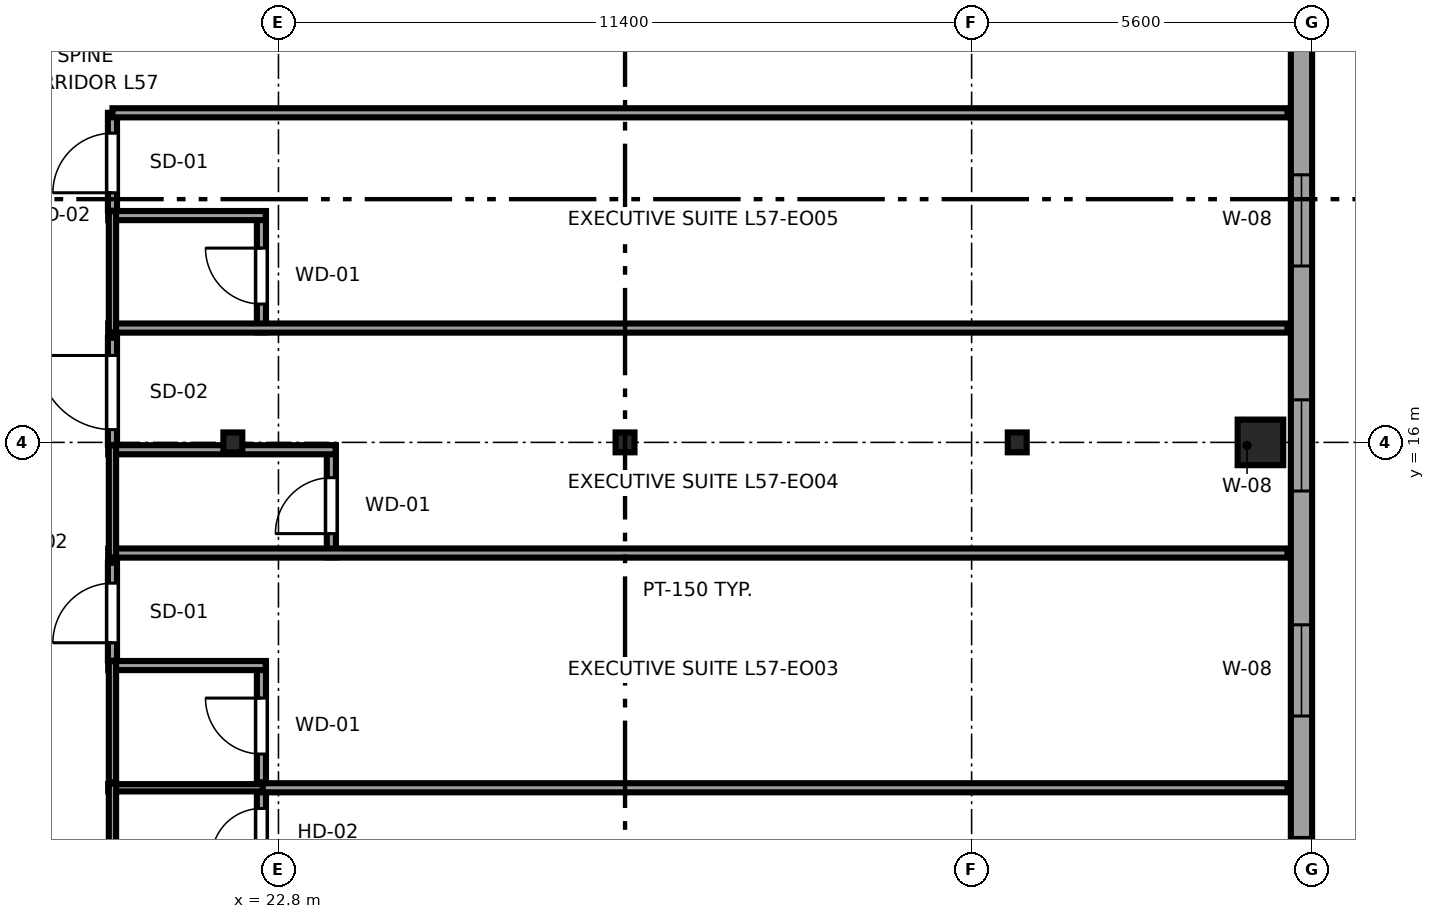
"""IFC4 building model, lengths in metres.
Left out: names, types, materials, properties, quantities, classifications, styles, units other than length and angle.
Written with IfcOpenShell. Run it as: python <this file> out.ifc"""

import sys

from ifc_helpers import new_model, si_unit, direction, frame, frame_2d, origin, origin_2d, place, context, subcontext, project, spatial, rectangle, i_section, extrude, source, transform, mapped, element, fill, save


model = new_model("IFC4")
c1 = context("Model", 3, precision=1e-05, world=origin(), true_north=direction((0.0, 1.0)))
c2 = subcontext(c1, "Body", "Model", "MODEL_VIEW")
j1 = project(units=[si_unit("LENGTHUNIT", "METRE"), si_unit("PLANEANGLEUNIT", "RADIAN")], contexts=[c1])
p1 = place(None, origin())
s1 = spatial("IfcSite", under=j1, at=p1, CompositionType="ELEMENT")
p2 = place(p1, origin())
s2 = spatial("IfcBuilding", under=s1, at=p2, CompositionType="ELEMENT")
p3 = place(p2, frame((0.0, 0.0, 216.8)))
s3 = spatial("IfcBuildingStorey", under=s2, at=p3, CompositionType="ELEMENT", Elevation=216.8)
m1 = source(origin(), c2, "Body", "SweptSolid", [
    extrude(i_section(OverallWidth=0.311, OverallDepth=0.327, WebThickness=0.016, FlangeThickness=0.025, FilletRadius=0.017, at=origin_2d()), origin(), (0.0, 0.0, 1.0), 3.55),
])
for number, where, z_axis, x_axis in (
    (1, (22.05, 16.0, 0.0), (0.0, 0.0, 1.0), (1.0, 0.0, 0.0)),
    (2, (28.5, 16.0, 0.0), (0.0, 0.0, 1.0), (1.0, 0.0, 0.0)),
    (3, (34.95, 16.0, 0.0), (0.0, 0.0, 1.0), (1.0, 0.0, 0.0)),
):
    element("IfcColumn", number, at=place(p3, frame(where, z_axis=z_axis, x_axis=x_axis)), inside=s3, PredefinedType="COLUMN", context=c2, shape_type="MappedRepresentation", body=[
        mapped(m1, transform((0.0, 0.0, 0.0), x_axis=(1.0, 0.0, 0.0), y_axis=(0.0, 1.0, 0.0), z_axis=(0.0, 0.0, 1.0), scale=1.0)),
    ])
m2 = source(origin(), c2, "Body", "SweptSolid", [
    extrude(rectangle(XDim=0.75, YDim=0.75, at=origin_2d()), origin(), (0.0, 0.0, 1.0), 3.55),
])
p4 = place(p3, frame((38.95, 16.0, 0.0), z_axis=(0.0, 0.0, 1.0), x_axis=(1.0, 0.0, 0.0)))
e4 = element("IfcColumn", 4, at=p4, inside=s3, PredefinedType="COLUMN", context=c2, shape_type="MappedRepresentation", body=[
    mapped(m2, transform((0.0, 0.0, 0.0), x_axis=(1.0, 0.0, 0.0), y_axis=(0.0, 1.0, 0.0), z_axis=(0.0, 0.0, 1.0), scale=1.0)),
])
p5 = place(p3, frame((39.625, 7.017, 0.0), z_axis=(0.0, 0.0, 1.0), x_axis=(0.0, 1.0, 0.0)))
e5 = element("IfcWall", 5, at=p5, inside=s3, PredefinedType="SOLIDWALL", context=c2, shape_type="SweptSolid", body=[
    extrude(rectangle(XDim=24.579, YDim=0.35, at=frame_2d((12.29, 0.0))), origin(), (0.0, 0.0, 1.0), 3.37),
])
p6 = place(p5, frame((20.291, 0.0, 0.68)))
e6 = element("IfcOpeningElement", 6, at=p6, cuts=e5, PredefinedType="OPENING", context=c2, shape_type="SweptSolid", body=[
    extrude(rectangle(XDim=2.7, YDim=1.95, at=frame_2d((1.35, 0.975))), frame((0.0, 0.185, 0.0), z_axis=(0.0, -1.0, 0.0), x_axis=(1.0, 0.0, 0.0)), (0.0, 0.0, 1.0), 0.37),
])
p7 = place(p5, frame((0.986, 0.0, 0.62)))
e7 = element("IfcOpeningElement", 7, at=p7, cuts=e5, PredefinedType="OPENING", context=c2, shape_type="SweptSolid", body=[
    extrude(rectangle(XDim=1.5, YDim=1.55, at=frame_2d((0.75, 0.775))), frame((0.0, 0.185, 0.0), z_axis=(0.0, -1.0, 0.0), x_axis=(1.0, 0.0, 0.0)), (0.0, 0.0, 1.0), 0.37),
])
p8 = place(p5, frame((4.483, 0.0, 0.62)))
e8 = element("IfcOpeningElement", 8, at=p8, cuts=e5, PredefinedType="OPENING", context=c2, shape_type="SweptSolid", body=[
    extrude(rectangle(XDim=1.5, YDim=1.55, at=frame_2d((0.75, 0.775))), frame((0.0, 0.185, 0.0), z_axis=(0.0, -1.0, 0.0), x_axis=(1.0, 0.0, 0.0)), (0.0, 0.0, 1.0), 0.37),
])
p9 = place(p5, frame((8.183, 0.0, 0.62)))
e9 = element("IfcOpeningElement", 9, at=p9, cuts=e5, PredefinedType="OPENING", context=c2, shape_type="SweptSolid", body=[
    extrude(rectangle(XDim=1.5, YDim=1.55, at=frame_2d((0.75, 0.775))), frame((0.0, 0.185, 0.0), z_axis=(0.0, -1.0, 0.0), x_axis=(1.0, 0.0, 0.0)), (0.0, 0.0, 1.0), 0.37),
])
p10 = place(p5, frame((11.883, 0.0, 0.62)))
e10 = element("IfcOpeningElement", 10, at=p10, cuts=e5, PredefinedType="OPENING", context=c2, shape_type="SweptSolid", body=[
    extrude(rectangle(XDim=1.5, YDim=1.55, at=frame_2d((0.75, 0.775))), frame((0.0, 0.185, 0.0), z_axis=(0.0, -1.0, 0.0), x_axis=(1.0, 0.0, 0.0)), (0.0, 0.0, 1.0), 0.37),
])
p11 = place(p3, frame((22.52, 8.4, 0.0), z_axis=(0.0, 0.0, 1.0), x_axis=(0.0, 1.0, 0.0)))
e11 = element("IfcWall", 11, at=p11, inside=s3, PredefinedType="PARTITIONING", context=c2, shape_type="SweptSolid", body=[
    extrude(rectangle(XDim=1.99, YDim=0.15, at=frame_2d((0.995, 0.0))), origin(), (0.0, 0.0, 1.0), 3.37),
])
p12 = place(p11, frame((0.76, 0.0, 0.0)))
e12 = element("IfcOpeningElement", 12, at=p12, cuts=e11, PredefinedType="OPENING", context=c2, shape_type="SweptSolid", body=[
    extrude(rectangle(XDim=0.82, YDim=2.01, at=frame_2d((0.41, 1.005))), frame((0.0, 0.085, 0.0), z_axis=(0.0, -1.0, 0.0), x_axis=(1.0, 0.0, 0.0)), (0.0, 0.0, 1.0), 0.17),
])
p13 = place(p3, frame((20.0, 10.32, 0.0), z_axis=(0.0, 0.0, 1.0), x_axis=(1.0, 0.0, 0.0)))
e13 = element("IfcWall", 13, at=p13, inside=s3, PredefinedType="PLUMBINGWALL", context=c2, shape_type="SweptSolid", body=[
    extrude(rectangle(XDim=2.59, YDim=0.12, at=frame_2d((1.295, 0.0))), origin(), (0.0, 0.0, 1.0), 3.37),
])
p14 = place(p3, frame((20.07, 8.4, 0.0), z_axis=(0.0, 0.0, 1.0), x_axis=(0.0, 1.0, 0.0)))
e14 = element("IfcWall", 14, at=p14, inside=s3, PredefinedType="PLUMBINGWALL", context=c2, shape_type="SweptSolid", body=[
    extrude(rectangle(XDim=1.99, YDim=0.12, at=frame_2d((0.995, 0.0))), origin(), (0.0, 0.0, 1.0), 3.37),
])
p15 = place(p3, frame((22.52, 10.41, 0.0), z_axis=(0.0, 0.0, 1.0), x_axis=(0.0, 1.0, 0.0)))
e15 = element("IfcWall", 15, at=p15, inside=s3, PredefinedType="PARTITIONING", context=c2, shape_type="SweptSolid", body=[
    extrude(rectangle(XDim=1.99, YDim=0.15, at=frame_2d((0.995, 0.0))), origin(), (0.0, 0.0, 1.0), 3.37),
])
p16 = place(p15, frame((0.465, 0.0, 0.0)))
e16 = element("IfcOpeningElement", 16, at=p16, cuts=e15, PredefinedType="OPENING", context=c2, shape_type="SweptSolid", body=[
    extrude(rectangle(XDim=0.92, YDim=2.01, at=frame_2d((0.46, 1.005))), frame((0.0, 0.085, 0.0), z_axis=(0.0, -1.0, 0.0), x_axis=(1.0, 0.0, 0.0)), (0.0, 0.0, 1.0), 0.17),
])
p17 = place(p3, frame((20.0, 12.33, 0.0), z_axis=(0.0, 0.0, 1.0), x_axis=(1.0, 0.0, 0.0)))
e17 = element("IfcWall", 17, at=p17, inside=s3, PredefinedType="PARTITIONING", context=c2, shape_type="SweptSolid", body=[
    extrude(rectangle(XDim=2.59, YDim=0.15, at=frame_2d((1.295, 0.0))), origin(), (0.0, 0.0, 1.0), 3.37),
])
p18 = place(p3, frame((20.07, 10.41, 0.0), z_axis=(0.0, 0.0, 1.0), x_axis=(0.0, 1.0, 0.0)))
e18 = element("IfcWall", 18, at=p18, inside=s3, PredefinedType="PLUMBINGWALL", context=c2, shape_type="SweptSolid", body=[
    extrude(rectangle(XDim=1.99, YDim=0.12, at=frame_2d((0.995, 0.0))), origin(), (0.0, 0.0, 1.0), 3.37),
])
p19 = place(p3, frame((23.67, 14.11, 0.0), z_axis=(0.0, 0.0, 1.0), x_axis=(0.0, 1.0, 0.0)))
e19 = element("IfcWall", 19, at=p19, inside=s3, PredefinedType="PARTITIONING", context=c2, shape_type="SweptSolid", body=[
    extrude(rectangle(XDim=1.839, YDim=0.15, at=frame_2d((0.919, 0.0))), origin(), (0.0, 0.0, 1.0), 3.37),
])
p20 = place(p19, frame((0.389, 0.0, 0.0)))
e20 = element("IfcOpeningElement", 20, at=p20, cuts=e19, PredefinedType="OPENING", context=c2, shape_type="SweptSolid", body=[
    extrude(rectangle(XDim=0.92, YDim=2.01, at=frame_2d((0.46, 1.005))), frame((0.0, 0.085, 0.0), z_axis=(0.0, -1.0, 0.0), x_axis=(1.0, 0.0, 0.0)), (0.0, 0.0, 1.0), 0.17),
])
p21 = place(p3, frame((20.0, 14.18, 0.0), z_axis=(0.0, 0.0, 1.0), x_axis=(1.0, 0.0, 0.0)))
e21 = element("IfcWall", 21, at=p21, inside=s3, PredefinedType="PARTITIONING", context=c2, shape_type="SweptSolid", body=[
    extrude(rectangle(XDim=19.395, YDim=0.15, at=frame_2d((9.698, 0.0))), origin(), (0.0, 0.0, 1.0), 3.37),
])
p22 = place(p3, frame((20.0, 15.879, 0.0), z_axis=(0.0, 0.0, 1.0), x_axis=(1.0, 0.0, 0.0)))
e22 = element("IfcWall", 22, at=p22, inside=s3, PredefinedType="PARTITIONING", context=c2, shape_type="SweptSolid", body=[
    extrude(rectangle(XDim=3.74, YDim=0.15, at=frame_2d((1.87, 0.0))), origin(), (0.0, 0.0, 1.0), 2.758),
])
p23 = place(p3, frame((20.07, 14.11, 0.0), z_axis=(0.0, 0.0, 1.0), x_axis=(0.0, 1.0, 0.0)))
e23 = element("IfcWall", 23, at=p23, inside=s3, PredefinedType="PLUMBINGWALL", context=c2, shape_type="SweptSolid", body=[
    extrude(rectangle(XDim=1.839, YDim=0.12, at=frame_2d((0.919, 0.0))), origin(), (0.0, 0.0, 1.0), 3.37),
])
p24 = place(p3, frame((22.52, 17.81, 0.0), z_axis=(0.0, 0.0, 1.0), x_axis=(0.0, 1.0, 0.0)))
e24 = element("IfcWall", 24, at=p24, inside=s3, PredefinedType="PARTITIONING", context=c2, shape_type="SweptSolid", body=[
    extrude(rectangle(XDim=1.99, YDim=0.15, at=frame_2d((0.995, 0.0))), origin(), (0.0, 0.0, 1.0), 3.37),
])
p25 = place(p24, frame((0.465, 0.0, 0.0)))
e25 = element("IfcOpeningElement", 25, at=p25, cuts=e24, PredefinedType="OPENING", context=c2, shape_type="SweptSolid", body=[
    extrude(rectangle(XDim=0.92, YDim=2.01, at=frame_2d((0.46, 1.005))), frame((0.0, 0.085, 0.0), z_axis=(0.0, -1.0, 0.0), x_axis=(1.0, 0.0, 0.0)), (0.0, 0.0, 1.0), 0.17),
])
p26 = place(p3, frame((20.0, 17.88, 0.0), z_axis=(0.0, 0.0, 1.0), x_axis=(1.0, 0.0, 0.0)))
e26 = element("IfcWall", 26, at=p26, inside=s3, PredefinedType="PARTITIONING", context=c2, shape_type="SweptSolid", body=[
    extrude(rectangle(XDim=19.395, YDim=0.15, at=frame_2d((9.698, 0.0))), origin(), (0.0, 0.0, 1.0), 3.37),
])
p27 = place(p3, frame((20.0, 19.73, 0.0), z_axis=(0.0, 0.0, 1.0), x_axis=(1.0, 0.0, 0.0)))
e27 = element("IfcWall", 27, at=p27, inside=s3, PredefinedType="PARTITIONING", context=c2, shape_type="SweptSolid", body=[
    extrude(rectangle(XDim=2.59, YDim=0.15, at=frame_2d((1.295, 0.0))), origin(), (0.0, 0.0, 1.0), 3.37),
])
p28 = place(p3, frame((20.07, 17.81, 0.0), z_axis=(0.0, 0.0, 1.0), x_axis=(0.0, 1.0, 0.0)))
e28 = element("IfcWall", 28, at=p28, inside=s3, PredefinedType="PLUMBINGWALL", context=c2, shape_type="SweptSolid", body=[
    extrude(rectangle(XDim=1.99, YDim=0.12, at=frame_2d((0.995, 0.0))), origin(), (0.0, 0.0, 1.0), 3.37),
])
p29 = place(p3, frame((22.54, 10.32, 0.0), z_axis=(0.0, 0.0, 1.0), x_axis=(1.0, 0.0, 0.0)))
e29 = element("IfcWall", 29, at=p29, inside=s3, PredefinedType="PARTITIONING", context=c2, shape_type="SweptSolid", body=[
    extrude(rectangle(XDim=16.855, YDim=0.15, at=frame_2d((8.427, 0.0))), origin(), (0.0, 0.0, 1.0), 3.37),
])
p30 = place(p3, frame((20.07, 12.41, 0.0), z_axis=(0.0, 0.0, 1.0), x_axis=(0.0, 1.0, 0.0)))
e30 = element("IfcWall", 30, at=p30, inside=s3, PredefinedType="PARTITIONING", context=c2, shape_type="SweptSolid", body=[
    extrude(rectangle(XDim=1.61, YDim=0.15, at=frame_2d((0.805, 0.0))), origin(), (0.0, 0.0, 1.0), 3.37),
])
p31 = place(p30, frame((0.295, 0.0, 0.0)))
e31 = element("IfcOpeningElement", 31, at=p31, cuts=e30, PredefinedType="OPENING", context=c2, shape_type="SweptSolid", body=[
    extrude(rectangle(XDim=0.98, YDim=2.12, at=frame_2d((0.49, 1.06))), frame((0.0, 0.085, 0.0), z_axis=(0.0, -1.0, 0.0), x_axis=(1.0, 0.0, 0.0)), (0.0, 0.0, 1.0), 0.17),
])
p32 = place(p3, frame((20.07, 15.959, 0.0), z_axis=(0.0, 0.0, 1.0), x_axis=(0.0, 1.0, 0.0)))
e32 = element("IfcWall", 32, at=p32, inside=s3, PredefinedType="PARTITIONING", context=c2, shape_type="SweptSolid", body=[
    extrude(rectangle(XDim=1.761, YDim=0.15, at=frame_2d((0.88, 0.0))), origin(), (0.0, 0.0, 1.0), 3.37),
])
p33 = place(p32, frame((0.25, 0.0, 0.0)))
e33 = element("IfcOpeningElement", 33, at=p33, cuts=e32, PredefinedType="OPENING", context=c2, shape_type="SweptSolid", body=[
    extrude(rectangle(XDim=1.22, YDim=2.08, at=frame_2d((0.61, 1.04))), frame((0.0, 0.085, 0.0), z_axis=(0.0, -1.0, 0.0), x_axis=(1.0, 0.0, 0.0)), (0.0, 0.0, 1.0), 0.17),
])
p34 = place(p3, frame((20.07, 19.81, 0.0), z_axis=(0.0, 0.0, 1.0), x_axis=(0.0, 1.0, 0.0)))
e34 = element("IfcWall", 34, at=p34, inside=s3, PredefinedType="PARTITIONING", context=c2, shape_type="SweptSolid", body=[
    extrude(rectangle(XDim=1.61, YDim=0.15, at=frame_2d((0.805, 0.0))), origin(), (0.0, 0.0, 1.0), 3.37),
])
p35 = place(p34, frame((0.295, 0.0, 0.0)))
e35 = element("IfcOpeningElement", 35, at=p35, cuts=e34, PredefinedType="OPENING", context=c2, shape_type="SweptSolid", body=[
    extrude(rectangle(XDim=0.98, YDim=2.12, at=frame_2d((0.49, 1.06))), frame((0.0, 0.085, 0.0), z_axis=(0.0, -1.0, 0.0), x_axis=(1.0, 0.0, 0.0)), (0.0, 0.0, 1.0), 0.17),
])
p36 = place(p3, frame((20.07, 21.42, 0.0), z_axis=(0.0, 0.0, 1.0), x_axis=(1.0, 0.0, 0.0)))
e36 = element("IfcWall", 36, at=p36, inside=s3, PredefinedType="PARTITIONING", context=c2, shape_type="SweptSolid", body=[
    extrude(rectangle(XDim=19.325, YDim=0.15, at=frame_2d((9.663, 0.0))), origin(), (0.0, 0.0, 1.0), 3.37),
])
m3 = source(origin(), c2, "Body", "SweptSolid", [
    extrude(rectangle(XDim=1.5, YDim=1.55, at=frame_2d((0.75, 0.775))), frame((0.0, 0.09, 0.0), z_axis=(0.0, -1.0, 0.0), x_axis=(1.0, 0.0, 0.0)), (0.0, 0.0, 1.0), 0.06),
])
p37 = place(p7, origin())
e37 = element("IfcWindow", 37, at=p37, inside=s3, PartitioningType="SINGLE_PANEL", PredefinedType="WINDOW", context=c2, shape_type="MappedRepresentation", body=[
    mapped(m3, transform((0.0, 0.0, 0.0), x_axis=(1.0, 0.0, 0.0), y_axis=(0.0, 1.0, 0.0), z_axis=(0.0, 0.0, 1.0), scale=1.0)),
])
fill(e7, e37)
p38 = place(p8, origin())
e38 = element("IfcWindow", 38, at=p38, inside=s3, PartitioningType="SINGLE_PANEL", PredefinedType="WINDOW", context=c2, shape_type="MappedRepresentation", body=[
    mapped(m3, transform((0.0, 0.0, 0.0), x_axis=(1.0, 0.0, 0.0), y_axis=(0.0, 1.0, 0.0), z_axis=(0.0, 0.0, 1.0), scale=1.0)),
])
fill(e8, e38)
p39 = place(p9, origin())
e39 = element("IfcWindow", 39, at=p39, inside=s3, PartitioningType="SINGLE_PANEL", PredefinedType="WINDOW", context=c2, shape_type="MappedRepresentation", body=[
    mapped(m3, transform((0.0, 0.0, 0.0), x_axis=(1.0, 0.0, 0.0), y_axis=(0.0, 1.0, 0.0), z_axis=(0.0, 0.0, 1.0), scale=1.0)),
])
fill(e9, e39)
p40 = place(p10, origin())
e40 = element("IfcWindow", 40, at=p40, inside=s3, PartitioningType="SINGLE_PANEL", PredefinedType="WINDOW", context=c2, shape_type="MappedRepresentation", body=[
    mapped(m3, transform((0.0, 0.0, 0.0), x_axis=(1.0, 0.0, 0.0), y_axis=(0.0, 1.0, 0.0), z_axis=(0.0, 0.0, 1.0), scale=1.0)),
])
fill(e10, e40)
m4 = source(origin(), c2, "Body", "SweptSolid", [
    extrude(rectangle(XDim=0.82, YDim=2.01, at=frame_2d((0.41, 1.005))), frame((0.0, 0.025, 0.0), z_axis=(0.0, -1.0, 0.0), x_axis=(1.0, 0.0, 0.0)), (0.0, 0.0, 1.0), 0.05),
])
p41 = place(p12, origin())
e41 = element("IfcDoor", 41, at=p41, inside=s3, OperationType="SINGLE_SWING_LEFT", PredefinedType="DOOR", context=c2, shape_type="MappedRepresentation", body=[
    mapped(m4, transform((0.0, 0.0, 0.0), x_axis=(1.0, 0.0, 0.0), y_axis=(0.0, 1.0, 0.0), z_axis=(0.0, 0.0, 1.0), scale=1.0)),
])
fill(e12, e41)
m5 = source(origin(), c2, "Body", "SweptSolid", [
    extrude(rectangle(XDim=0.92, YDim=2.01, at=frame_2d((0.46, 1.005))), frame((0.0, 0.025, 0.0), z_axis=(0.0, -1.0, 0.0), x_axis=(1.0, 0.0, 0.0)), (0.0, 0.0, 1.0), 0.05),
])
p42 = place(p16, origin())
e42 = element("IfcDoor", 42, at=p42, inside=s3, OperationType="SINGLE_SWING_RIGHT", PredefinedType="DOOR", context=c2, shape_type="MappedRepresentation", body=[
    mapped(m5, transform((0.0, 0.0, 0.0), x_axis=(1.0, 0.0, 0.0), y_axis=(0.0, 1.0, 0.0), z_axis=(0.0, 0.0, 1.0), scale=1.0)),
])
fill(e16, e42)
p43 = place(p20, origin())
e43 = element("IfcDoor", 43, at=p43, inside=s3, OperationType="SINGLE_SWING_LEFT", PredefinedType="DOOR", context=c2, shape_type="MappedRepresentation", body=[
    mapped(m5, transform((0.0, 0.0, 0.0), x_axis=(1.0, 0.0, 0.0), y_axis=(0.0, 1.0, 0.0), z_axis=(0.0, 0.0, 1.0), scale=1.0)),
])
fill(e20, e43)
p44 = place(p25, origin())
e44 = element("IfcDoor", 44, at=p44, inside=s3, OperationType="SINGLE_SWING_RIGHT", PredefinedType="DOOR", context=c2, shape_type="MappedRepresentation", body=[
    mapped(m5, transform((0.0, 0.0, 0.0), x_axis=(1.0, 0.0, 0.0), y_axis=(0.0, 1.0, 0.0), z_axis=(0.0, 0.0, 1.0), scale=1.0)),
])
fill(e25, e44)
m6 = source(origin(), c2, "Body", "SweptSolid", [
    extrude(rectangle(XDim=0.98, YDim=2.12, at=frame_2d((0.49, 1.06))), frame((0.0, 0.025, 0.0), z_axis=(0.0, -1.0, 0.0), x_axis=(1.0, 0.0, 0.0)), (0.0, 0.0, 1.0), 0.05),
])
p45 = place(p31, origin())
e45 = element("IfcDoor", 45, at=p45, inside=s3, OperationType="SINGLE_SWING_LEFT", PredefinedType="DOOR", context=c2, shape_type="MappedRepresentation", body=[
    mapped(m6, transform((0.0, 0.0, 0.0), x_axis=(1.0, 0.0, 0.0), y_axis=(0.0, 1.0, 0.0), z_axis=(0.0, 0.0, 1.0), scale=1.0)),
])
fill(e31, e45)
m7 = source(origin(), c2, "Body", "SweptSolid", [
    extrude(rectangle(XDim=1.22, YDim=2.08, at=frame_2d((0.61, 1.04))), frame((0.0, 0.025, 0.0), z_axis=(0.0, -1.0, 0.0), x_axis=(1.0, 0.0, 0.0)), (0.0, 0.0, 1.0), 0.05),
])
p46 = place(p33, origin())
e46 = element("IfcDoor", 46, at=p46, inside=s3, OperationType="SINGLE_SWING_RIGHT", PredefinedType="DOOR", context=c2, shape_type="MappedRepresentation", body=[
    mapped(m7, transform((0.0, 0.0, 0.0), x_axis=(1.0, 0.0, 0.0), y_axis=(0.0, 1.0, 0.0), z_axis=(0.0, 0.0, 1.0), scale=1.0)),
])
fill(e33, e46)
p47 = place(p35, origin())
e47 = element("IfcDoor", 47, at=p47, inside=s3, OperationType="SINGLE_SWING_LEFT", PredefinedType="DOOR", context=c2, shape_type="MappedRepresentation", body=[
    mapped(m6, transform((0.0, 0.0, 0.0), x_axis=(1.0, 0.0, 0.0), y_axis=(0.0, 1.0, 0.0), z_axis=(0.0, 0.0, 1.0), scale=1.0)),
])
fill(e35, e47)
save(model, sys.argv[1])
